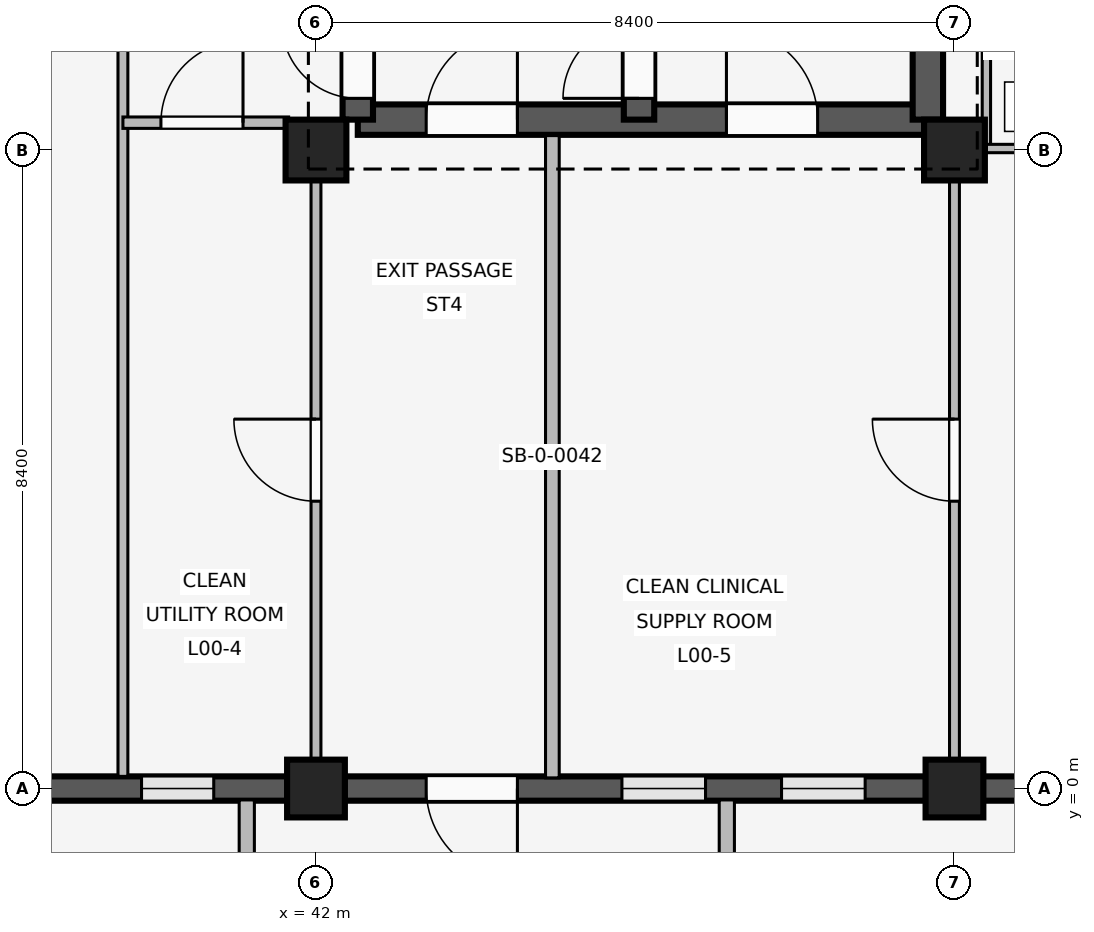
"""IFC4 building model, lengths in metres.
Left out: names, types, materials, properties, quantities, classifications, styles, units other than length and angle.
Written with IfcOpenShell. Run it as: python <this file> out.ifc"""

import sys

from ifc_helpers import new_model, si_unit, direction, frame, frame_2d, origin, origin_2d, place, context, subcontext, project, spatial, rectangle, extrude, element, fill, save


model = new_model("IFC4")
c1 = context("Model", 3, precision=1e-05, world=origin(), true_north=direction((0.0, 1.0)))
c2 = subcontext(c1, "Body", "Model", "MODEL_VIEW")
j1 = project(units=[si_unit("LENGTHUNIT", "METRE"), si_unit("PLANEANGLEUNIT", "RADIAN")], contexts=[c1])
p1 = place(None, origin())
s1 = spatial("IfcSite", under=j1, at=p1, CompositionType="ELEMENT")
p2 = place(p1, origin())
s2 = spatial("IfcBuilding", under=s1, at=p2, CompositionType="ELEMENT")
p3 = place(p2, origin())
s3 = spatial("IfcBuildingStorey", under=s2, at=p3, CompositionType="ELEMENT", Elevation=0.0)
p4 = place(p3, frame((42.0, 0.0, 0.0), z_axis=(0.0, 0.0, 1.0), x_axis=(1.0, 0.0, 0.0)))
e1 = element("IfcColumn", 1, at=p4, inside=s3, PredefinedType="COLUMN", context=c2, shape_type="SweptSolid", body=[
    extrude(rectangle(XDim=0.76, YDim=0.76, at=origin_2d()), origin(), (0.0, 0.0, 1.0), 4.8),
])
p5 = place(p3, frame((42.0, 8.4, 0.0), z_axis=(0.0, 0.0, 1.0), x_axis=(1.0, 0.0, 0.0)))
e2 = element("IfcColumn", 2, at=p5, inside=s3, PredefinedType="COLUMN", context=c2, shape_type="SweptSolid", body=[
    extrude(rectangle(XDim=0.8, YDim=0.8, at=origin_2d()), origin(), (0.0, 0.0, 1.0), 4.8),
])
p6 = place(p3, frame((50.4, 0.0, 0.0), z_axis=(0.0, 0.0, 1.0), x_axis=(1.0, 0.0, 0.0)))
e3 = element("IfcColumn", 3, at=p6, inside=s3, PredefinedType="COLUMN", context=c2, shape_type="SweptSolid", body=[
    extrude(rectangle(XDim=0.76, YDim=0.76, at=origin_2d()), origin(), (0.0, 0.0, 1.0), 4.8),
])
p7 = place(p3, frame((50.4, 8.4, 0.0), z_axis=(0.0, 0.0, 1.0), x_axis=(1.0, 0.0, 0.0)))
e4 = element("IfcColumn", 4, at=p7, inside=s3, PredefinedType="COLUMN", context=c2, shape_type="SweptSolid", body=[
    extrude(rectangle(XDim=0.8, YDim=0.8, at=origin_2d()), origin(), (0.0, 0.0, 1.0), 4.8),
])
p8 = place(p3, frame((41.625, 0.0, 0.0), z_axis=(0.0, 0.0, 1.0), x_axis=(-1.0, 0.0, 0.0)))
e5 = element("IfcWall", 5, at=p8, inside=s3, PredefinedType="SOLIDWALL", context=c2, shape_type="SweptSolid", body=[
    extrude(rectangle(XDim=7.65, YDim=0.32, at=frame_2d((3.825, 0.0))), origin(), (0.0, 0.0, 1.0), 3.82),
])
p9 = place(p8, frame((0.97, 0.0, 0.85)))
e6 = element("IfcOpeningElement", 6, at=p9, cuts=e5, PredefinedType="OPENING", context=c2, shape_type="SweptSolid", body=[
    extrude(rectangle(XDim=0.95, YDim=1.6, at=frame_2d((0.475, 0.8))), frame((0.0, 0.17, 0.0), z_axis=(0.0, -1.0, 0.0), x_axis=(1.0, 0.0, 0.0)), (0.0, 0.0, 1.0), 0.34),
])
p10 = place(p8, frame((5.416, 0.0, 0.85)))
e7 = element("IfcOpeningElement", 7, at=p10, cuts=e5, PredefinedType="OPENING", context=c2, shape_type="SweptSolid", body=[
    extrude(rectangle(XDim=0.95, YDim=1.6, at=frame_2d((0.475, 0.8))), frame((0.0, 0.17, 0.0), z_axis=(0.0, -1.0, 0.0), x_axis=(1.0, 0.0, 0.0)), (0.0, 0.0, 1.0), 0.34),
])
p11 = place(p3, frame((41.09, -0.15, 0.0), z_axis=(0.0, 0.0, 1.0), x_axis=(0.0, -1.0, 0.0)))
e8 = element("IfcWall", 8, at=p11, inside=s3, PredefinedType="ELEMENTEDWALL", context=c2, shape_type="SweptSolid", body=[
    extrude(rectangle(XDim=0.85, YDim=0.2, at=frame_2d((0.425, 0.0))), origin(), (0.0, 0.0, 1.0), 3.8),
])
p12 = place(p3, frame((50.025, 0.0, 0.0), z_axis=(0.0, 0.0, 1.0), x_axis=(-1.0, 0.0, 0.0)))
e9 = element("IfcWall", 9, at=p12, inside=s3, PredefinedType="SOLIDWALL", context=c2, shape_type="SweptSolid", body=[
    extrude(rectangle(XDim=7.65, YDim=0.32, at=frame_2d((3.825, 0.0))), origin(), (0.0, 0.0, 1.0), 3.82),
])
p13 = place(p12, frame((5.375, 0.0, 0.0)))
e10 = element("IfcOpeningElement", 10, at=p13, cuts=e9, PredefinedType="OPENING", context=c2, shape_type="SweptSolid", body=[
    extrude(rectangle(XDim=1.2, YDim=2.25, at=frame_2d((0.6, 1.125))), frame((0.0, 0.17, 0.0), z_axis=(0.0, -1.0, 0.0), x_axis=(1.0, 0.0, 0.0)), (0.0, 0.0, 1.0), 0.34),
])
p14 = place(p12, frame((0.8, 0.0, 0.85)))
e11 = element("IfcOpeningElement", 11, at=p14, cuts=e9, PredefinedType="OPENING", context=c2, shape_type="SweptSolid", body=[
    extrude(rectangle(XDim=1.1, YDim=1.6, at=frame_2d((0.55, 0.8))), frame((0.0, 0.17, 0.0), z_axis=(0.0, -1.0, 0.0), x_axis=(1.0, 0.0, 0.0)), (0.0, 0.0, 1.0), 0.34),
])
p15 = place(p12, frame((2.9, 0.0, 0.85)))
e12 = element("IfcOpeningElement", 12, at=p15, cuts=e9, PredefinedType="OPENING", context=c2, shape_type="SweptSolid", body=[
    extrude(rectangle(XDim=1.1, YDim=1.6, at=frame_2d((0.55, 0.8))), frame((0.0, 0.17, 0.0), z_axis=(0.0, -1.0, 0.0), x_axis=(1.0, 0.0, 0.0)), (0.0, 0.0, 1.0), 0.34),
])
p16 = place(p3, frame((47.405, -0.15, 0.0), z_axis=(0.0, 0.0, 1.0), x_axis=(0.0, -1.0, 0.0)))
e13 = element("IfcWall", 13, at=p16, inside=s3, PredefinedType="ELEMENTEDWALL", context=c2, shape_type="SweptSolid", body=[
    extrude(rectangle(XDim=0.85, YDim=0.2, at=frame_2d((0.425, 0.0))), origin(), (0.0, 0.0, 1.0), 3.8),
])
p17 = place(p3, frame((58.425, 0.0, 0.0), z_axis=(0.0, 0.0, 1.0), x_axis=(-1.0, 0.0, 0.0)))
e14 = element("IfcWall", 14, at=p17, inside=s3, PredefinedType="SOLIDWALL", context=c2, shape_type="SweptSolid", body=[
    extrude(rectangle(XDim=7.65, YDim=0.32, at=frame_2d((3.825, 0.0))), origin(), (0.0, 0.0, 1.0), 3.82),
])
p18 = place(p17, frame((0.939, 0.0, 0.85)))
e15 = element("IfcOpeningElement", 15, at=p18, cuts=e14, PredefinedType="OPENING", context=c2, shape_type="SweptSolid", body=[
    extrude(rectangle(XDim=1.64, YDim=1.75, at=frame_2d((0.82, 0.875))), frame((0.0, 0.17, 0.0), z_axis=(0.0, -1.0, 0.0), x_axis=(1.0, 0.0, 0.0)), (0.0, 0.0, 1.0), 0.34),
])
p19 = place(p17, frame((5.071, 0.0, 0.85)))
e16 = element("IfcOpeningElement", 16, at=p19, cuts=e14, PredefinedType="OPENING", context=c2, shape_type="SweptSolid", body=[
    extrude(rectangle(XDim=1.64, YDim=1.75, at=frame_2d((0.82, 0.875))), frame((0.0, 0.17, 0.0), z_axis=(0.0, -1.0, 0.0), x_axis=(1.0, 0.0, 0.0)), (0.0, 0.0, 1.0), 0.34),
])
p20 = place(p3, frame((42.55, 8.8, 0.0), z_axis=(0.0, 0.0, 1.0), x_axis=(1.0, 0.0, 0.0)))
e17 = element("IfcWall", 17, at=p20, inside=s3, PredefinedType="SHEAR", context=c2, shape_type="SweptSolid", body=[
    extrude(rectangle(XDim=7.5, YDim=0.4, at=frame_2d((3.75, 0.0))), origin(), (0.0, 0.0, 1.0), 4.52),
])
p21 = place(p20, frame((4.85, 0.0, 0.0)))
e18 = element("IfcOpeningElement", 18, at=p21, cuts=e17, PredefinedType="OPENING", context=c2, shape_type="SweptSolid", body=[
    extrude(rectangle(XDim=1.2, YDim=2.2, at=frame_2d((0.6, 1.1))), frame((0.0, 0.21, 0.0), z_axis=(0.0, -1.0, 0.0), x_axis=(1.0, 0.0, 0.0)), (0.0, 0.0, 1.0), 0.42),
])
p22 = place(p20, frame((0.9, 0.0, 0.0)))
e19 = element("IfcOpeningElement", 19, at=p22, cuts=e17, PredefinedType="OPENING", context=c2, shape_type="SweptSolid", body=[
    extrude(rectangle(XDim=1.2, YDim=2.2, at=frame_2d((0.6, 1.1))), frame((0.0, 0.21, 0.0), z_axis=(0.0, -1.0, 0.0), x_axis=(1.0, 0.0, 0.0)), (0.0, 0.0, 1.0), 0.42),
])
p23 = place(p3, frame((42.55, 8.8, 0.0), z_axis=(0.0, 0.0, 1.0), x_axis=(0.0, 1.0, 0.0)))
e20 = element("IfcWall", 20, at=p23, inside=s3, PredefinedType="SHEAR", context=c2, shape_type="SweptSolid", body=[
    extrude(rectangle(XDim=7.55, YDim=0.4, at=frame_2d((3.775, 0.0))), origin(), (0.0, 0.0, 1.0), 4.52),
])
p24 = place(p23, frame((0.28, 0.0, 0.0)))
e21 = element("IfcOpeningElement", 21, at=p24, cuts=e20, PredefinedType="OPENING", context=c2, shape_type="SweptSolid", body=[
    extrude(rectangle(XDim=1.0, YDim=2.15, at=frame_2d((0.5, 1.075))), frame((0.0, 0.21, 0.0), z_axis=(0.0, -1.0, 0.0), x_axis=(1.0, 0.0, 0.0)), (0.0, 0.0, 1.0), 0.42),
])
p25 = place(p3, frame((50.05, 8.8, 0.0), z_axis=(0.0, 0.0, 1.0), x_axis=(0.0, 1.0, 0.0)))
e22 = element("IfcWall", 22, at=p25, inside=s3, PredefinedType="SHEAR", context=c2, shape_type="SweptSolid", body=[
    extrude(rectangle(XDim=7.55, YDim=0.4, at=frame_2d((3.775, 0.0))), origin(), (0.0, 0.0, 1.0), 4.52),
])
p26 = place(p25, frame((2.4, 0.0, 0.0)))
e23 = element("IfcOpeningElement", 23, at=p26, cuts=e22, PredefinedType="OPENING", context=c2, shape_type="SweptSolid", body=[
    extrude(rectangle(XDim=1.2, YDim=2.2, at=frame_2d((0.6, 1.1))), frame((0.0, 0.21, 0.0), z_axis=(0.0, -1.0, 0.0), x_axis=(1.0, 0.0, 0.0)), (0.0, 0.0, 1.0), 0.42),
])
p27 = place(p3, frame((46.25, 8.8, 0.0), z_axis=(0.0, 0.0, 1.0), x_axis=(0.0, 1.0, 0.0)))
e24 = element("IfcWall", 24, at=p27, inside=s3, PredefinedType="SHEAR", context=c2, shape_type="SweptSolid", body=[
    extrude(rectangle(XDim=7.55, YDim=0.4, at=frame_2d((3.775, 0.0))), origin(), (0.0, 0.0, 1.0), 4.52),
])
p28 = place(p27, frame((0.28, 0.0, 0.0)))
e25 = element("IfcOpeningElement", 25, at=p28, cuts=e24, PredefinedType="OPENING", context=c2, shape_type="SweptSolid", body=[
    extrude(rectangle(XDim=1.0, YDim=2.15, at=frame_2d((0.5, 1.075))), frame((0.0, 0.21, 0.0), z_axis=(0.0, -1.0, 0.0), x_axis=(1.0, 0.0, 0.0)), (0.0, 0.0, 1.0), 0.42),
])
p29 = place(p3, frame((39.46, 0.16, 0.0), z_axis=(0.0, 0.0, 1.0), x_axis=(0.0, 1.0, 0.0)))
e26 = element("IfcWall", 26, at=p29, inside=s3, PredefinedType="PARTITIONING", context=c2, shape_type="SweptSolid", body=[
    extrude(rectangle(XDim=10.94, YDim=0.13, at=frame_2d((5.47, 0.0))), origin(), (0.0, 0.0, 1.0), 3.8),
])
p30 = place(p3, frame((39.46, 8.76, 0.0), z_axis=(0.0, 0.0, 1.0), x_axis=(1.0, 0.0, 0.0)))
e27 = element("IfcWall", 27, at=p30, inside=s3, PredefinedType="PARTITIONING", context=c2, shape_type="SweptSolid", body=[
    extrude(rectangle(XDim=2.18, YDim=0.15, at=frame_2d((1.09, 0.0))), origin(), (0.0, 0.0, 1.0), 3.8),
])
p31 = place(p30, frame((0.5, 0.0, 0.0)))
e28 = element("IfcOpeningElement", 28, at=p31, cuts=e27, PredefinedType="OPENING", context=c2, shape_type="SweptSolid", body=[
    extrude(rectangle(XDim=1.08, YDim=2.15, at=frame_2d((0.54, 1.075))), frame((0.0, 0.085, 0.0), z_axis=(0.0, -1.0, 0.0), x_axis=(1.0, 0.0, 0.0)), (0.0, 0.0, 1.0), 0.17),
])
p32 = place(p3, frame((42.0, 0.14, 0.0), z_axis=(0.0, 0.0, 1.0), x_axis=(0.0, 1.0, 0.0)))
e29 = element("IfcWall", 29, at=p32, inside=s3, PredefinedType="PARTITIONING", context=c2, shape_type="SweptSolid", body=[
    extrude(rectangle(XDim=8.21, YDim=0.13, at=frame_2d((4.105, 0.0))), origin(), (0.0, 0.0, 1.0), 3.8),
])
p33 = place(p32, frame((3.64, 0.0, 0.0)))
e30 = element("IfcOpeningElement", 30, at=p33, cuts=e29, PredefinedType="OPENING", context=c2, shape_type="SweptSolid", body=[
    extrude(rectangle(XDim=1.08, YDim=2.15, at=frame_2d((0.54, 1.075))), frame((0.0, 0.075, 0.0), z_axis=(0.0, -1.0, 0.0), x_axis=(1.0, 0.0, 0.0)), (0.0, 0.0, 1.0), 0.15),
])
p34 = place(p3, frame((45.11, 0.14, 0.0), z_axis=(0.0, 0.0, 1.0), x_axis=(0.0, 1.0, 0.0)))
e31 = element("IfcWall", 31, at=p34, inside=s3, PredefinedType="PARTITIONING", context=c2, shape_type="SweptSolid", body=[
    extrude(rectangle(XDim=8.45, YDim=0.18, at=frame_2d((4.225, 0.0))), origin(), (0.0, 0.0, 1.0), 3.8),
])
p35 = place(p3, frame((50.4, 0.14, 0.0), z_axis=(0.0, 0.0, 1.0), x_axis=(0.0, 1.0, 0.0)))
e32 = element("IfcWall", 32, at=p35, inside=s3, PredefinedType="PARTITIONING", context=c2, shape_type="SweptSolid", body=[
    extrude(rectangle(XDim=8.21, YDim=0.13, at=frame_2d((4.105, 0.0))), origin(), (0.0, 0.0, 1.0), 3.8),
])
p36 = place(p35, frame((3.64, 0.0, 0.0)))
e33 = element("IfcOpeningElement", 33, at=p36, cuts=e32, PredefinedType="OPENING", context=c2, shape_type="SweptSolid", body=[
    extrude(rectangle(XDim=1.08, YDim=2.15, at=frame_2d((0.54, 1.075))), frame((0.0, 0.075, 0.0), z_axis=(0.0, -1.0, 0.0), x_axis=(1.0, 0.0, 0.0)), (0.0, 0.0, 1.0), 0.15),
])
p37 = place(p3, frame((50.82, 8.42, 0.0), z_axis=(0.0, 0.0, 1.0), x_axis=(0.0, 1.0, 0.0)))
e34 = element("IfcWall", 34, at=p37, inside=s3, PredefinedType="PARTITIONING", context=c2, shape_type="SweptSolid", body=[
    extrude(rectangle(XDim=2.61, YDim=0.11, at=frame_2d((1.305, 0.0))), origin(), (0.0, 0.0, 1.0), 3.8),
])
p38 = place(p3, frame((50.82, 8.42, 0.0), z_axis=(0.0, 0.0, 1.0), x_axis=(1.0, 0.0, 0.0)))
e35 = element("IfcWall", 35, at=p38, inside=s3, PredefinedType="PARTITIONING", context=c2, shape_type="SweptSolid", body=[
    extrude(rectangle(XDim=1.98, YDim=0.11, at=frame_2d((0.99, 0.0))), origin(), (0.0, 0.0, 1.0), 3.8),
])
p39 = place(p38, frame((0.54, 0.0, 0.0)))
e36 = element("IfcOpeningElement", 36, at=p39, cuts=e35, PredefinedType="OPENING", context=c2, shape_type="SweptSolid", body=[
    extrude(rectangle(XDim=0.9, YDim=2.1, at=frame_2d((0.45, 1.05))), frame((0.0, 0.065, 0.0), z_axis=(0.0, -1.0, 0.0), x_axis=(1.0, 0.0, 0.0)), (0.0, 0.0, 1.0), 0.13),
])
p40 = place(p9, origin())
e37 = element("IfcWindow", 37, at=p40, inside=s3, PartitioningType="SINGLE_PANEL", PredefinedType="WINDOW", context=c2, shape_type="SweptSolid", body=[
    extrude(rectangle(XDim=0.95, YDim=1.6, at=frame_2d((0.475, 0.8))), frame((0.0, 0.03, 0.0), z_axis=(0.0, -1.0, 0.0), x_axis=(1.0, 0.0, 0.0)), (0.0, 0.0, 1.0), 0.06),
])
fill(e6, e37)
p41 = place(p13, origin())
e38 = element("IfcDoor", 38, at=p41, inside=s3, OperationType="SINGLE_SWING_LEFT", PredefinedType="DOOR", context=c2, shape_type="SweptSolid", body=[
    extrude(rectangle(XDim=1.2, YDim=2.25, at=frame_2d((0.6, 1.125))), frame((0.0, 0.025, 0.0), z_axis=(0.0, -1.0, 0.0), x_axis=(1.0, 0.0, 0.0)), (0.0, 0.0, 1.0), 0.05),
])
fill(e10, e38)
p42 = place(p14, origin())
e39 = element("IfcWindow", 39, at=p42, inside=s3, PartitioningType="SINGLE_PANEL", PredefinedType="WINDOW", context=c2, shape_type="SweptSolid", body=[
    extrude(rectangle(XDim=1.1, YDim=1.6, at=frame_2d((0.55, 0.8))), frame((0.0, 0.03, 0.0), z_axis=(0.0, -1.0, 0.0), x_axis=(1.0, 0.0, 0.0)), (0.0, 0.0, 1.0), 0.06),
])
fill(e11, e39)
p43 = place(p15, origin())
e40 = element("IfcWindow", 40, at=p43, inside=s3, PartitioningType="SINGLE_PANEL", PredefinedType="WINDOW", context=c2, shape_type="SweptSolid", body=[
    extrude(rectangle(XDim=1.1, YDim=1.6, at=frame_2d((0.55, 0.8))), frame((0.0, 0.03, 0.0), z_axis=(0.0, -1.0, 0.0), x_axis=(1.0, 0.0, 0.0)), (0.0, 0.0, 1.0), 0.06),
])
fill(e12, e40)
p44 = place(p21, origin())
e41 = element("IfcDoor", 41, at=p44, inside=s3, OperationType="SINGLE_SWING_LEFT", PredefinedType="DOOR", context=c2, shape_type="SweptSolid", body=[
    extrude(rectangle(XDim=1.2, YDim=2.2, at=frame_2d((0.6, 1.1))), frame((0.0, 0.025, 0.0), z_axis=(0.0, -1.0, 0.0), x_axis=(1.0, 0.0, 0.0)), (0.0, 0.0, 1.0), 0.05),
])
fill(e18, e41)
p45 = place(p24, origin())
e42 = element("IfcDoor", 42, at=p45, inside=s3, OperationType="SINGLE_SWING_RIGHT", PredefinedType="DOOR", context=c2, shape_type="SweptSolid", body=[
    extrude(rectangle(XDim=1.0, YDim=2.15, at=frame_2d((0.5, 1.075))), frame((0.0, 0.025, 0.0), z_axis=(0.0, -1.0, 0.0), x_axis=(1.0, 0.0, 0.0)), (0.0, 0.0, 1.0), 0.05),
])
fill(e21, e42)
p46 = place(p28, origin())
e43 = element("IfcDoor", 43, at=p46, inside=s3, OperationType="SINGLE_SWING_LEFT", PredefinedType="DOOR", context=c2, shape_type="SweptSolid", body=[
    extrude(rectangle(XDim=1.0, YDim=2.15, at=frame_2d((0.5, 1.075))), frame((0.0, 0.025, 0.0), z_axis=(0.0, -1.0, 0.0), x_axis=(1.0, 0.0, 0.0)), (0.0, 0.0, 1.0), 0.05),
])
fill(e25, e43)
p47 = place(p22, origin())
e44 = element("IfcDoor", 44, at=p47, inside=s3, OperationType="SINGLE_SWING_RIGHT", PredefinedType="DOOR", context=c2, shape_type="SweptSolid", body=[
    extrude(rectangle(XDim=1.2, YDim=2.2, at=frame_2d((0.6, 1.1))), frame((0.0, 0.025, 0.0), z_axis=(0.0, -1.0, 0.0), x_axis=(1.0, 0.0, 0.0)), (0.0, 0.0, 1.0), 0.05),
])
fill(e19, e44)
p48 = place(p31, origin())
e45 = element("IfcDoor", 45, at=p48, inside=s3, OperationType="SINGLE_SWING_RIGHT", PredefinedType="DOOR", context=c2, shape_type="SweptSolid", body=[
    extrude(rectangle(XDim=1.08, YDim=2.15, at=frame_2d((0.54, 1.075))), frame((0.0, 0.025, 0.0), z_axis=(0.0, -1.0, 0.0), x_axis=(1.0, 0.0, 0.0)), (0.0, 0.0, 1.0), 0.05),
])
fill(e28, e45)
p49 = place(p33, origin())
e46 = element("IfcDoor", 46, at=p49, inside=s3, OperationType="SINGLE_SWING_RIGHT", PredefinedType="DOOR", context=c2, shape_type="SweptSolid", body=[
    extrude(rectangle(XDim=1.08, YDim=2.15, at=frame_2d((0.54, 1.075))), frame((0.0, 0.025, 0.0), z_axis=(0.0, -1.0, 0.0), x_axis=(1.0, 0.0, 0.0)), (0.0, 0.0, 1.0), 0.05),
])
fill(e30, e46)
p50 = place(p36, origin())
e47 = element("IfcDoor", 47, at=p50, inside=s3, OperationType="SINGLE_SWING_RIGHT", PredefinedType="DOOR", context=c2, shape_type="SweptSolid", body=[
    extrude(rectangle(XDim=1.08, YDim=2.15, at=frame_2d((0.54, 1.075))), frame((0.0, 0.025, 0.0), z_axis=(0.0, -1.0, 0.0), x_axis=(1.0, 0.0, 0.0)), (0.0, 0.0, 1.0), 0.05),
])
fill(e33, e47)
save(model, sys.argv[1])
